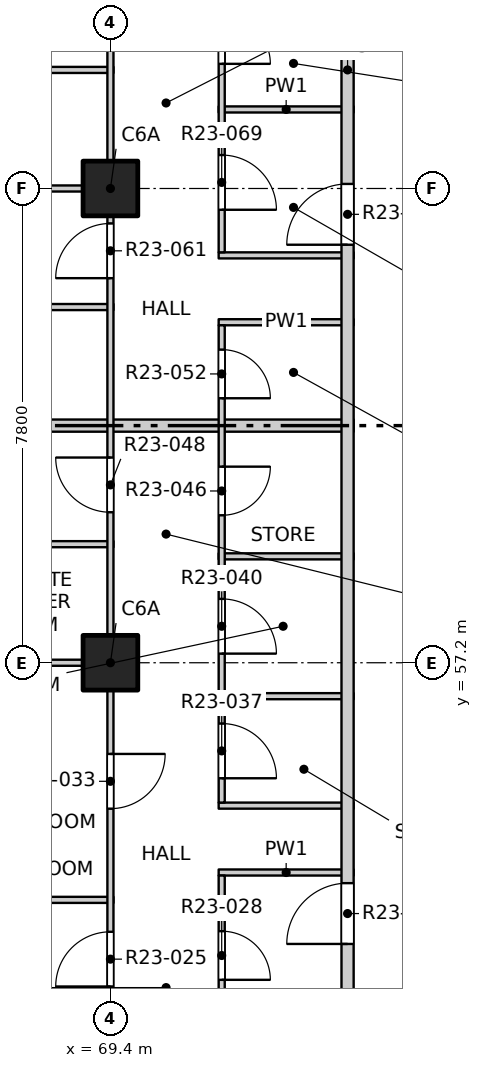
"""IFC4 building model, lengths in metres.
Left out: names, types, materials, properties, quantities, classifications, styles, units other than length and angle.
Written with IfcOpenShell. Run it as: python <this file> out.ifc"""

import sys

from ifc_helpers import new_model, si_unit, direction, frame, frame_2d, origin, origin_2d, place, context, subcontext, project, spatial, rectangle, extrude, element, fill, save


model = new_model("IFC4")
c1 = context("Model", 3, precision=1e-05, world=origin(), true_north=direction((0.0, 1.0)))
c2 = subcontext(c1, "Body", "Model", "MODEL_VIEW")
j1 = project(units=[si_unit("LENGTHUNIT", "METRE"), si_unit("PLANEANGLEUNIT", "RADIAN")], contexts=[c1])
p1 = place(None, origin())
s1 = spatial("IfcSite", under=j1, at=p1, CompositionType="ELEMENT")
p2 = place(p1, origin())
s2 = spatial("IfcBuilding", under=s1, at=p2, CompositionType="ELEMENT")
p3 = place(p2, frame((0.0, 0.0, 234.7)))
s3 = spatial("IfcBuildingStorey", under=s2, at=p3, CompositionType="ELEMENT", Elevation=234.7)
for number, where, z_axis, x_axis in (
    (1, (69.4, 57.2, -0.25), (0.0, 0.0, 1.0), (1.0, 0.0, 0.0)),
    (2, (69.4, 65.0, -0.25), (0.0, 0.0, 1.0), (1.0, 0.0, 0.0)),
):
    element("IfcColumn", number, at=place(p3, frame(where, z_axis=z_axis, x_axis=x_axis)), inside=s3, PredefinedType="COLUMN", context=c2, shape_type="SweptSolid", body=[
        extrude(rectangle(XDim=0.9, YDim=0.9, at=origin_2d()), origin(), (0.0, 0.0, 1.0), 3.4),
    ])
p4 = place(p3, frame((61.9, 53.3, 0.0), z_axis=(0.0, 0.0, 1.0), x_axis=(1.0, 0.0, 0.0)))
e3 = element("IfcWall", 3, at=p4, inside=s3, PredefinedType="PARTITIONING", context=c2, shape_type="SweptSolid", body=[
    extrude(rectangle(XDim=7.55, YDim=0.1, at=frame_2d((3.775, 0.0))), origin(), (0.0, 0.0, 1.0), 3.15),
])
for number, where, z_axis, x_axis in (
    (4, (71.18, 53.75, 0.0), (0.0, 0.0, 1.0), (1.0, 0.0, 0.0)),
    (5, (71.18, 54.85, 0.0), (0.0, 0.0, 1.0), (1.0, 0.0, 0.0)),
    (6, (71.18, 56.65, 0.0), (0.0, 0.0, 1.0), (1.0, 0.0, 0.0)),
):
    element("IfcWall", number, at=place(p3, frame(where, z_axis=z_axis, x_axis=x_axis)), inside=s3, PredefinedType="PARTITIONING", context=c2, shape_type="SweptSolid", body=[
        extrude(rectangle(XDim=2.22, YDim=0.1, at=frame_2d((1.11, 0.0))), origin(), (0.0, 0.0, 1.0), 3.15),
    ])
p5 = place(p3, frame((61.9, 57.2, 0.0), z_axis=(0.0, 0.0, 1.0), x_axis=(1.0, 0.0, 0.0)))
e7 = element("IfcWall", 7, at=p5, inside=s3, PredefinedType="PARTITIONING", context=c2, shape_type="SweptSolid", body=[
    extrude(rectangle(XDim=7.55, YDim=0.1, at=frame_2d((3.775, 0.0))), origin(), (0.0, 0.0, 1.0), 3.15),
])
p6 = place(p3, frame((71.18, 58.95, 0.0), z_axis=(0.0, 0.0, 1.0), x_axis=(1.0, 0.0, 0.0)))
e8 = element("IfcWall", 8, at=p6, inside=s3, PredefinedType="PARTITIONING", context=c2, shape_type="SweptSolid", body=[
    extrude(rectangle(XDim=2.22, YDim=0.1, at=frame_2d((1.11, 0.0))), origin(), (0.0, 0.0, 1.0), 3.15),
])
p7 = place(p3, frame((66.05, 59.15, 0.0), z_axis=(0.0, 0.0, 1.0), x_axis=(1.0, 0.0, 0.0)))
e9 = element("IfcWall", 9, at=p7, inside=s3, PredefinedType="PARTITIONING", context=c2, shape_type="SweptSolid", body=[
    extrude(rectangle(XDim=3.4, YDim=0.1, at=frame_2d((1.7, 0.0))), origin(), (0.0, 0.0, 1.0), 3.15),
])
p8 = place(p3, frame((61.9, 61.1, 0.0), z_axis=(0.0, 0.0, 1.0), x_axis=(1.0, 0.0, 0.0)))
e10 = element("IfcWall", 10, at=p8, inside=s3, PredefinedType="PARTITIONING", context=c2, shape_type="SweptSolid", body=[
    extrude(rectangle(XDim=11.5, YDim=0.2, at=frame_2d((5.75, 0.0))), origin(), (0.0, 0.0, 1.0), 2.55),
])
p9 = place(p3, frame((71.18, 62.8, 0.0), z_axis=(0.0, 0.0, 1.0), x_axis=(1.0, 0.0, 0.0)))
e11 = element("IfcWall", 11, at=p9, inside=s3, PredefinedType="PARTITIONING", context=c2, shape_type="SweptSolid", body=[
    extrude(rectangle(XDim=2.22, YDim=0.1, at=frame_2d((1.11, 0.0))), origin(), (0.0, 0.0, 1.0), 3.15),
])
p10 = place(p3, frame((65.75, 63.05, 0.0), z_axis=(0.0, 0.0, 1.0), x_axis=(1.0, 0.0, 0.0)))
e12 = element("IfcWall", 12, at=p10, inside=s3, PredefinedType="PARTITIONING", context=c2, shape_type="SweptSolid", body=[
    extrude(rectangle(XDim=3.7, YDim=0.1, at=frame_2d((1.85, 0.0))), origin(), (0.0, 0.0, 1.0), 3.15),
])
p11 = place(p3, frame((71.18, 63.9, 0.0), z_axis=(0.0, 0.0, 1.0), x_axis=(1.0, 0.0, 0.0)))
e13 = element("IfcWall", 13, at=p11, inside=s3, PredefinedType="PARTITIONING", context=c2, shape_type="SweptSolid", body=[
    extrude(rectangle(XDim=2.22, YDim=0.1, at=frame_2d((1.11, 0.0))), origin(), (0.0, 0.0, 1.0), 3.15),
])
p12 = place(p3, frame((61.9, 65.0, 0.0), z_axis=(0.0, 0.0, 1.0), x_axis=(1.0, 0.0, 0.0)))
e14 = element("IfcWall", 14, at=p12, inside=s3, PredefinedType="PARTITIONING", context=c2, shape_type="SweptSolid", body=[
    extrude(rectangle(XDim=7.55, YDim=0.1, at=frame_2d((3.775, 0.0))), origin(), (0.0, 0.0, 1.0), 3.15),
])
p13 = place(p3, frame((71.18, 66.3, 0.0), z_axis=(0.0, 0.0, 1.0), x_axis=(1.0, 0.0, 0.0)))
e15 = element("IfcWall", 15, at=p13, inside=s3, PredefinedType="PARTITIONING", context=c2, shape_type="SweptSolid", body=[
    extrude(rectangle(XDim=2.22, YDim=0.1, at=frame_2d((1.11, 0.0))), origin(), (0.0, 0.0, 1.0), 3.15),
])
p14 = place(p3, frame((65.75, 66.95, 0.0), z_axis=(0.0, 0.0, 1.0), x_axis=(1.0, 0.0, 0.0)))
e16 = element("IfcWall", 16, at=p14, inside=s3, PredefinedType="PARTITIONING", context=c2, shape_type="SweptSolid", body=[
    extrude(rectangle(XDim=3.7, YDim=0.1, at=frame_2d((1.85, 0.0))), origin(), (0.0, 0.0, 1.0), 3.15),
])
p15 = place(p3, frame((69.4, 41.9, 0.0), z_axis=(0.0, 0.0, 1.0), x_axis=(0.0, 1.0, 0.0)))
e17 = element("IfcWall", 17, at=p15, inside=s3, PredefinedType="PARTITIONING", context=c2, shape_type="SweptSolid", body=[
    extrude(rectangle(XDim=46.2, YDim=0.1, at=frame_2d((23.1, 0.0))), origin(), (0.0, 0.0, 1.0), 3.15),
])
p16 = place(p15, frame((1.2, 0.0, 0.0)))
e18 = element("IfcOpeningElement", 18, at=p16, cuts=e17, PredefinedType="OPENING", context=c2, shape_type="SweptSolid", body=[
    extrude(rectangle(XDim=0.9, YDim=2.1, at=frame_2d((0.45, 1.05))), frame((0.0, 0.06, 0.0), z_axis=(0.0, -1.0, 0.0), x_axis=(1.0, 0.0, 0.0)), (0.0, 0.0, 1.0), 0.12),
])
p17 = place(p15, frame((6.025, 0.0, 0.0)))
e19 = element("IfcOpeningElement", 19, at=p17, cuts=e17, PredefinedType="OPENING", context=c2, shape_type="SweptSolid", body=[
    extrude(rectangle(XDim=0.9, YDim=2.1, at=frame_2d((0.45, 1.05))), frame((0.0, 0.06, 0.0), z_axis=(0.0, -1.0, 0.0), x_axis=(1.0, 0.0, 0.0)), (0.0, 0.0, 1.0), 0.12),
])
p18 = place(p15, frame((9.975, 0.0, 0.0)))
e20 = element("IfcOpeningElement", 20, at=p18, cuts=e17, PredefinedType="OPENING", context=c2, shape_type="SweptSolid", body=[
    extrude(rectangle(XDim=0.9, YDim=2.1, at=frame_2d((0.45, 1.05))), frame((0.0, 0.06, 0.0), z_axis=(0.0, -1.0, 0.0), x_axis=(1.0, 0.0, 0.0)), (0.0, 0.0, 1.0), 0.12),
])
p19 = place(p15, frame((12.9, 0.0, 0.0)))
e21 = element("IfcOpeningElement", 21, at=p19, cuts=e17, PredefinedType="OPENING", context=c2, shape_type="SweptSolid", body=[
    extrude(rectangle(XDim=0.9, YDim=2.1, at=frame_2d((0.45, 1.05))), frame((0.0, 0.06, 0.0), z_axis=(0.0, -1.0, 0.0), x_axis=(1.0, 0.0, 0.0)), (0.0, 0.0, 1.0), 0.12),
])
p20 = place(p15, frame((17.775, 0.0, 0.0)))
e22 = element("IfcOpeningElement", 22, at=p20, cuts=e17, PredefinedType="OPENING", context=c2, shape_type="SweptSolid", body=[
    extrude(rectangle(XDim=0.9, YDim=2.1, at=frame_2d((0.45, 1.05))), frame((0.0, 0.06, 0.0), z_axis=(0.0, -1.0, 0.0), x_axis=(1.0, 0.0, 0.0)), (0.0, 0.0, 1.0), 0.12),
])
p21 = place(p15, frame((21.625, 0.0, 0.0)))
e23 = element("IfcOpeningElement", 23, at=p21, cuts=e17, PredefinedType="OPENING", context=c2, shape_type="SweptSolid", body=[
    extrude(rectangle(XDim=0.9, YDim=2.1, at=frame_2d((0.45, 1.05))), frame((0.0, 0.06, 0.0), z_axis=(0.0, -1.0, 0.0), x_axis=(1.0, 0.0, 0.0)), (0.0, 0.0, 1.0), 0.12),
])
p22 = place(p15, frame((25.575, 0.0, 0.0)))
e24 = element("IfcOpeningElement", 24, at=p22, cuts=e17, PredefinedType="OPENING", context=c2, shape_type="SweptSolid", body=[
    extrude(rectangle(XDim=0.9, YDim=2.1, at=frame_2d((0.45, 1.05))), frame((0.0, 0.06, 0.0), z_axis=(0.0, -1.0, 0.0), x_axis=(1.0, 0.0, 0.0)), (0.0, 0.0, 1.0), 0.12),
])
p23 = place(p15, frame((28.5, 0.0, 0.0)))
e25 = element("IfcOpeningElement", 25, at=p23, cuts=e17, PredefinedType="OPENING", context=c2, shape_type="SweptSolid", body=[
    extrude(rectangle(XDim=0.9, YDim=2.1, at=frame_2d((0.45, 1.05))), frame((0.0, 0.06, 0.0), z_axis=(0.0, -1.0, 0.0), x_axis=(1.0, 0.0, 0.0)), (0.0, 0.0, 1.0), 0.12),
])
p24 = place(p15, frame((32.4, 0.0, 0.0)))
e26 = element("IfcOpeningElement", 26, at=p24, cuts=e17, PredefinedType="OPENING", context=c2, shape_type="SweptSolid", body=[
    extrude(rectangle(XDim=0.9, YDim=2.1, at=frame_2d((0.45, 1.05))), frame((0.0, 0.06, 0.0), z_axis=(0.0, -1.0, 0.0), x_axis=(1.0, 0.0, 0.0)), (0.0, 0.0, 1.0), 0.12),
])
p25 = place(p15, frame((36.3, 0.0, 0.0)))
e27 = element("IfcOpeningElement", 27, at=p25, cuts=e17, PredefinedType="OPENING", context=c2, shape_type="SweptSolid", body=[
    extrude(rectangle(XDim=0.9, YDim=2.1, at=frame_2d((0.45, 1.05))), frame((0.0, 0.06, 0.0), z_axis=(0.0, -1.0, 0.0), x_axis=(1.0, 0.0, 0.0)), (0.0, 0.0, 1.0), 0.12),
])
p26 = place(p15, frame((40.2, 0.0, 0.0)))
e28 = element("IfcOpeningElement", 28, at=p26, cuts=e17, PredefinedType="OPENING", context=c2, shape_type="SweptSolid", body=[
    extrude(rectangle(XDim=0.9, YDim=2.1, at=frame_2d((0.45, 1.05))), frame((0.0, 0.06, 0.0), z_axis=(0.0, -1.0, 0.0), x_axis=(1.0, 0.0, 0.0)), (0.0, 0.0, 1.0), 0.12),
])
p27 = place(p15, frame((44.1, 0.0, 0.0)))
e29 = element("IfcOpeningElement", 29, at=p27, cuts=e17, PredefinedType="OPENING", context=c2, shape_type="SweptSolid", body=[
    extrude(rectangle(XDim=0.9, YDim=2.1, at=frame_2d((0.45, 1.05))), frame((0.0, 0.06, 0.0), z_axis=(0.0, -1.0, 0.0), x_axis=(1.0, 0.0, 0.0)), (0.0, 0.0, 1.0), 0.12),
])
p28 = place(p3, frame((71.23, 45.55, 0.0), z_axis=(0.0, 0.0, 1.0), x_axis=(0.0, 1.0, 0.0)))
e30 = element("IfcWall", 30, at=p28, inside=s3, PredefinedType="PARTITIONING", context=c2, shape_type="SweptSolid", body=[
    extrude(rectangle(XDim=8.15, YDim=0.1, at=frame_2d((4.075, 0.0))), origin(), (0.0, 0.0, 1.0), 3.15),
])
p29 = place(p28, frame((1.11, 0.0, 0.0)))
e31 = element("IfcOpeningElement", 31, at=p29, cuts=e30, PredefinedType="OPENING", context=c2, shape_type="SweptSolid", body=[
    extrude(rectangle(XDim=0.9, YDim=2.1, at=frame_2d((0.45, 1.05))), frame((0.0, 0.06, 0.0), z_axis=(0.0, -1.0, 0.0), x_axis=(1.0, 0.0, 0.0)), (0.0, 0.0, 1.0), 0.12),
])
p30 = place(p28, frame((3.92, 0.0, 0.0)))
e32 = element("IfcOpeningElement", 32, at=p30, cuts=e30, PredefinedType="OPENING", context=c2, shape_type="SweptSolid", body=[
    extrude(rectangle(XDim=0.8, YDim=2.1, at=frame_2d((0.4, 1.05))), frame((0.0, 0.06, 0.0), z_axis=(0.0, -1.0, 0.0), x_axis=(1.0, 0.0, 0.0)), (0.0, 0.0, 1.0), 0.12),
])
p31 = place(p28, frame((6.435, 0.0, 0.0)))
e33 = element("IfcOpeningElement", 33, at=p31, cuts=e30, PredefinedType="OPENING", context=c2, shape_type="SweptSolid", body=[
    extrude(rectangle(XDim=0.8, YDim=2.1, at=frame_2d((0.4, 1.05))), frame((0.0, 0.06, 0.0), z_axis=(0.0, -1.0, 0.0), x_axis=(1.0, 0.0, 0.0)), (0.0, 0.0, 1.0), 0.12),
])
p32 = place(p3, frame((71.23, 54.9, 0.0), z_axis=(0.0, 0.0, 1.0), x_axis=(0.0, 1.0, 0.0)))
e34 = element("IfcWall", 34, at=p32, inside=s3, PredefinedType="PARTITIONING", context=c2, shape_type="SweptSolid", body=[
    extrude(rectangle(XDim=7.85, YDim=0.1, at=frame_2d((3.925, 0.0))), origin(), (0.0, 0.0, 1.0), 3.15),
])
p33 = place(p32, frame((0.4, 0.0, 0.0)))
e35 = element("IfcOpeningElement", 35, at=p33, cuts=e34, PredefinedType="OPENING", context=c2, shape_type="SweptSolid", body=[
    extrude(rectangle(XDim=0.9, YDim=2.1, at=frame_2d((0.45, 1.05))), frame((0.0, 0.06, 0.0), z_axis=(0.0, -1.0, 0.0), x_axis=(1.0, 0.0, 0.0)), (0.0, 0.0, 1.0), 0.12),
])
p34 = place(p32, frame((2.45, 0.0, 0.0)))
e36 = element("IfcOpeningElement", 36, at=p34, cuts=e34, PredefinedType="OPENING", context=c2, shape_type="SweptSolid", body=[
    extrude(rectangle(XDim=0.9, YDim=2.1, at=frame_2d((0.45, 1.05))), frame((0.0, 0.06, 0.0), z_axis=(0.0, -1.0, 0.0), x_axis=(1.0, 0.0, 0.0)), (0.0, 0.0, 1.0), 0.12),
])
p35 = place(p32, frame((4.725, 0.0, 0.0)))
e37 = element("IfcOpeningElement", 37, at=p35, cuts=e34, PredefinedType="OPENING", context=c2, shape_type="SweptSolid", body=[
    extrude(rectangle(XDim=0.8, YDim=2.1, at=frame_2d((0.4, 1.05))), frame((0.0, 0.06, 0.0), z_axis=(0.0, -1.0, 0.0), x_axis=(1.0, 0.0, 0.0)), (0.0, 0.0, 1.0), 0.12),
])
p36 = place(p32, frame((6.65, 0.0, 0.0)))
e38 = element("IfcOpeningElement", 38, at=p36, cuts=e34, PredefinedType="OPENING", context=c2, shape_type="SweptSolid", body=[
    extrude(rectangle(XDim=0.8, YDim=2.1, at=frame_2d((0.4, 1.05))), frame((0.0, 0.06, 0.0), z_axis=(0.0, -1.0, 0.0), x_axis=(1.0, 0.0, 0.0)), (0.0, 0.0, 1.0), 0.12),
])
p37 = place(p3, frame((71.23, 63.95, 0.0), z_axis=(0.0, 0.0, 1.0), x_axis=(0.0, 1.0, 0.0)))
e39 = element("IfcWall", 39, at=p37, inside=s3, PredefinedType="PARTITIONING", context=c2, shape_type="SweptSolid", body=[
    extrude(rectangle(XDim=17.85, YDim=0.1, at=frame_2d((8.925, 0.0))), origin(), (0.0, 0.0, 1.0), 3.15),
])
p38 = place(p37, frame((0.7, 0.0, 0.0)))
e40 = element("IfcOpeningElement", 40, at=p38, cuts=e39, PredefinedType="OPENING", context=c2, shape_type="SweptSolid", body=[
    extrude(rectangle(XDim=0.9, YDim=2.1, at=frame_2d((0.45, 1.05))), frame((0.0, 0.06, 0.0), z_axis=(0.0, -1.0, 0.0), x_axis=(1.0, 0.0, 0.0)), (0.0, 0.0, 1.0), 0.12),
])
p39 = place(p37, frame((3.1, 0.0, 0.0)))
e41 = element("IfcOpeningElement", 41, at=p39, cuts=e39, PredefinedType="OPENING", context=c2, shape_type="SweptSolid", body=[
    extrude(rectangle(XDim=0.8, YDim=2.1, at=frame_2d((0.4, 1.05))), frame((0.0, 0.06, 0.0), z_axis=(0.0, -1.0, 0.0), x_axis=(1.0, 0.0, 0.0)), (0.0, 0.0, 1.0), 0.12),
])
p40 = place(p37, frame((5.115, 0.0, 0.0)))
e42 = element("IfcOpeningElement", 42, at=p40, cuts=e39, PredefinedType="OPENING", context=c2, shape_type="SweptSolid", body=[
    extrude(rectangle(XDim=0.9, YDim=2.1, at=frame_2d((0.45, 1.05))), frame((0.0, 0.06, 0.0), z_axis=(0.0, -1.0, 0.0), x_axis=(1.0, 0.0, 0.0)), (0.0, 0.0, 1.0), 0.12),
])
p41 = place(p37, frame((7.455, 0.0, 0.0)))
e43 = element("IfcOpeningElement", 43, at=p41, cuts=e39, PredefinedType="OPENING", context=c2, shape_type="SweptSolid", body=[
    extrude(rectangle(XDim=0.8, YDim=2.1, at=frame_2d((0.4, 1.05))), frame((0.0, 0.06, 0.0), z_axis=(0.0, -1.0, 0.0), x_axis=(1.0, 0.0, 0.0)), (0.0, 0.0, 1.0), 0.12),
])
p42 = place(p37, frame((10.54, 0.0, 0.0)))
e44 = element("IfcOpeningElement", 44, at=p42, cuts=e39, PredefinedType="OPENING", context=c2, shape_type="SweptSolid", body=[
    extrude(rectangle(XDim=0.9, YDim=2.1, at=frame_2d((0.45, 1.05))), frame((0.0, 0.06, 0.0), z_axis=(0.0, -1.0, 0.0), x_axis=(1.0, 0.0, 0.0)), (0.0, 0.0, 1.0), 0.12),
])
p43 = place(p37, frame((13.425, 0.0, 0.0)))
e45 = element("IfcOpeningElement", 45, at=p43, cuts=e39, PredefinedType="OPENING", context=c2, shape_type="SweptSolid", body=[
    extrude(rectangle(XDim=0.8, YDim=2.1, at=frame_2d((0.4, 1.05))), frame((0.0, 0.06, 0.0), z_axis=(0.0, -1.0, 0.0), x_axis=(1.0, 0.0, 0.0)), (0.0, 0.0, 1.0), 0.12),
])
p44 = place(p37, frame((15.95, 0.0, 0.0)))
e46 = element("IfcOpeningElement", 46, at=p44, cuts=e39, PredefinedType="OPENING", context=c2, shape_type="SweptSolid", body=[
    extrude(rectangle(XDim=0.9, YDim=2.1, at=frame_2d((0.45, 1.05))), frame((0.0, 0.06, 0.0), z_axis=(0.0, -1.0, 0.0), x_axis=(1.0, 0.0, 0.0)), (0.0, 0.0, 1.0), 0.12),
])
p45 = place(p3, frame((73.3, 49.5, 0.0), z_axis=(0.0, 0.0, 1.0), x_axis=(0.0, 1.0, 0.0)))
e47 = element("IfcWall", 47, at=p45, inside=s3, PredefinedType="PARTITIONING", context=c2, shape_type="SweptSolid", body=[
    extrude(rectangle(XDim=34.9, YDim=0.2, at=frame_2d((17.45, 0.0))), origin(), (0.0, 0.0, 1.0), 3.15),
])
p46 = place(p45, frame((3.075, 0.0, 0.0)))
e48 = element("IfcOpeningElement", 48, at=p46, cuts=e47, PredefinedType="OPENING", context=c2, shape_type="SweptSolid", body=[
    extrude(rectangle(XDim=1.0, YDim=2.1, at=frame_2d((0.5, 1.05))), frame((0.0, 0.11, 0.0), z_axis=(0.0, -1.0, 0.0), x_axis=(1.0, 0.0, 0.0)), (0.0, 0.0, 1.0), 0.22),
])
p47 = place(p45, frame((14.575, 0.0, 0.0)))
e49 = element("IfcOpeningElement", 49, at=p47, cuts=e47, PredefinedType="OPENING", context=c2, shape_type="SweptSolid", body=[
    extrude(rectangle(XDim=1.0, YDim=2.1, at=frame_2d((0.5, 1.05))), frame((0.0, 0.11, 0.0), z_axis=(0.0, -1.0, 0.0), x_axis=(1.0, 0.0, 0.0)), (0.0, 0.0, 1.0), 0.22),
])
p48 = place(p45, frame((33.625, 0.0, 0.0)))
e50 = element("IfcOpeningElement", 50, at=p48, cuts=e47, PredefinedType="OPENING", context=c2, shape_type="SweptSolid", body=[
    extrude(rectangle(XDim=1.0, YDim=2.1, at=frame_2d((0.5, 1.05))), frame((0.0, 0.11, 0.0), z_axis=(0.0, -1.0, 0.0), x_axis=(1.0, 0.0, 0.0)), (0.0, 0.0, 1.0), 0.22),
])
p49 = place(p18, origin())
e51 = element("IfcDoor", 51, at=p49, inside=s3, OperationType="SINGLE_SWING_LEFT", PredefinedType="DOOR", context=c2, shape_type="SweptSolid", body=[
    extrude(rectangle(XDim=0.9, YDim=2.1, at=frame_2d((0.45, 1.05))), frame((0.0, 0.025, 0.0), z_axis=(0.0, -1.0, 0.0), x_axis=(1.0, 0.0, 0.0)), (0.0, 0.0, 1.0), 0.05),
])
fill(e20, e51)
p50 = place(p31, origin())
e52 = element("IfcDoor", 52, at=p50, inside=s3, OperationType="SINGLE_SWING_RIGHT", PredefinedType="DOOR", context=c2, shape_type="SweptSolid", body=[
    extrude(rectangle(XDim=0.8, YDim=2.1, at=frame_2d((0.4, 1.05))), frame((0.0, 0.025, 0.0), z_axis=(0.0, -1.0, 0.0), x_axis=(1.0, 0.0, 0.0)), (0.0, 0.0, 1.0), 0.05),
])
fill(e33, e52)
p51 = place(p46, origin())
e53 = element("IfcDoor", 53, at=p51, inside=s3, OperationType="SINGLE_SWING_LEFT", PredefinedType="DOOR", context=c2, shape_type="SweptSolid", body=[
    extrude(rectangle(XDim=1.0, YDim=2.1, at=frame_2d((0.5, 1.05))), frame((0.0, 0.025, 0.0), z_axis=(0.0, -1.0, 0.0), x_axis=(1.0, 0.0, 0.0)), (0.0, 0.0, 1.0), 0.05),
])
fill(e48, e53)
p52 = place(p19, origin())
e54 = element("IfcDoor", 54, at=p52, inside=s3, OperationType="SINGLE_SWING_LEFT", PredefinedType="DOOR", context=c2, shape_type="SweptSolid", body=[
    extrude(rectangle(XDim=0.9, YDim=2.1, at=frame_2d((0.45, 1.05))), frame((0.0, 0.025, 0.0), z_axis=(0.0, -1.0, 0.0), x_axis=(1.0, 0.0, 0.0)), (0.0, 0.0, 1.0), 0.05),
])
fill(e21, e54)
p53 = place(p33, origin())
e55 = element("IfcDoor", 55, at=p53, inside=s3, OperationType="SINGLE_SWING_RIGHT", PredefinedType="DOOR", context=c2, shape_type="SweptSolid", body=[
    extrude(rectangle(XDim=0.9, YDim=2.1, at=frame_2d((0.45, 1.05))), frame((0.0, 0.025, 0.0), z_axis=(0.0, -1.0, 0.0), x_axis=(1.0, 0.0, 0.0)), (0.0, 0.0, 1.0), 0.05),
])
fill(e35, e55)
p54 = place(p34, origin())
e56 = element("IfcDoor", 56, at=p54, inside=s3, OperationType="SINGLE_SWING_RIGHT", PredefinedType="DOOR", context=c2, shape_type="SweptSolid", body=[
    extrude(rectangle(XDim=0.9, YDim=2.1, at=frame_2d((0.45, 1.05))), frame((0.0, 0.025, 0.0), z_axis=(0.0, -1.0, 0.0), x_axis=(1.0, 0.0, 0.0)), (0.0, 0.0, 1.0), 0.05),
])
fill(e36, e56)
p55 = place(p35, origin())
e57 = element("IfcDoor", 57, at=p55, inside=s3, OperationType="SINGLE_SWING_LEFT", PredefinedType="DOOR", context=c2, shape_type="SweptSolid", body=[
    extrude(rectangle(XDim=0.8, YDim=2.1, at=frame_2d((0.4, 1.05))), frame((0.0, 0.025, 0.0), z_axis=(0.0, -1.0, 0.0), x_axis=(1.0, 0.0, 0.0)), (0.0, 0.0, 1.0), 0.05),
])
fill(e37, e57)
p56 = place(p20, origin())
e58 = element("IfcDoor", 58, at=p56, inside=s3, OperationType="SINGLE_SWING_RIGHT", PredefinedType="DOOR", context=c2, shape_type="SweptSolid", body=[
    extrude(rectangle(XDim=0.9, YDim=2.1, at=frame_2d((0.45, 1.05))), frame((0.0, 0.025, 0.0), z_axis=(0.0, -1.0, 0.0), x_axis=(1.0, 0.0, 0.0)), (0.0, 0.0, 1.0), 0.05),
])
fill(e22, e58)
p57 = place(p36, origin())
e59 = element("IfcDoor", 59, at=p57, inside=s3, OperationType="SINGLE_SWING_RIGHT", PredefinedType="DOOR", context=c2, shape_type="SweptSolid", body=[
    extrude(rectangle(XDim=0.8, YDim=2.1, at=frame_2d((0.4, 1.05))), frame((0.0, 0.025, 0.0), z_axis=(0.0, -1.0, 0.0), x_axis=(1.0, 0.0, 0.0)), (0.0, 0.0, 1.0), 0.05),
])
fill(e38, e59)
p58 = place(p21, origin())
e60 = element("IfcDoor", 60, at=p58, inside=s3, OperationType="SINGLE_SWING_LEFT", PredefinedType="DOOR", context=c2, shape_type="SweptSolid", body=[
    extrude(rectangle(XDim=0.9, YDim=2.1, at=frame_2d((0.45, 1.05))), frame((0.0, 0.025, 0.0), z_axis=(0.0, -1.0, 0.0), x_axis=(1.0, 0.0, 0.0)), (0.0, 0.0, 1.0), 0.05),
])
fill(e23, e60)
p59 = place(p47, origin())
e61 = element("IfcDoor", 61, at=p59, inside=s3, OperationType="SINGLE_SWING_RIGHT", PredefinedType="DOOR", context=c2, shape_type="SweptSolid", body=[
    extrude(rectangle(XDim=1.0, YDim=2.1, at=frame_2d((0.5, 1.05))), frame((0.0, 0.025, 0.0), z_axis=(0.0, -1.0, 0.0), x_axis=(1.0, 0.0, 0.0)), (0.0, 0.0, 1.0), 0.05),
])
fill(e49, e61)
p60 = place(p38, origin())
e62 = element("IfcDoor", 62, at=p60, inside=s3, OperationType="SINGLE_SWING_RIGHT", PredefinedType="DOOR", context=c2, shape_type="SweptSolid", body=[
    extrude(rectangle(XDim=0.9, YDim=2.1, at=frame_2d((0.45, 1.05))), frame((0.0, 0.025, 0.0), z_axis=(0.0, -1.0, 0.0), x_axis=(1.0, 0.0, 0.0)), (0.0, 0.0, 1.0), 0.05),
])
fill(e40, e62)
p61 = place(p39, origin())
e63 = element("IfcDoor", 63, at=p61, inside=s3, OperationType="SINGLE_SWING_RIGHT", PredefinedType="DOOR", context=c2, shape_type="SweptSolid", body=[
    extrude(rectangle(XDim=0.8, YDim=2.1, at=frame_2d((0.4, 1.05))), frame((0.0, 0.025, 0.0), z_axis=(0.0, -1.0, 0.0), x_axis=(1.0, 0.0, 0.0)), (0.0, 0.0, 1.0), 0.05),
])
fill(e41, e63)
save(model, sys.argv[1])
